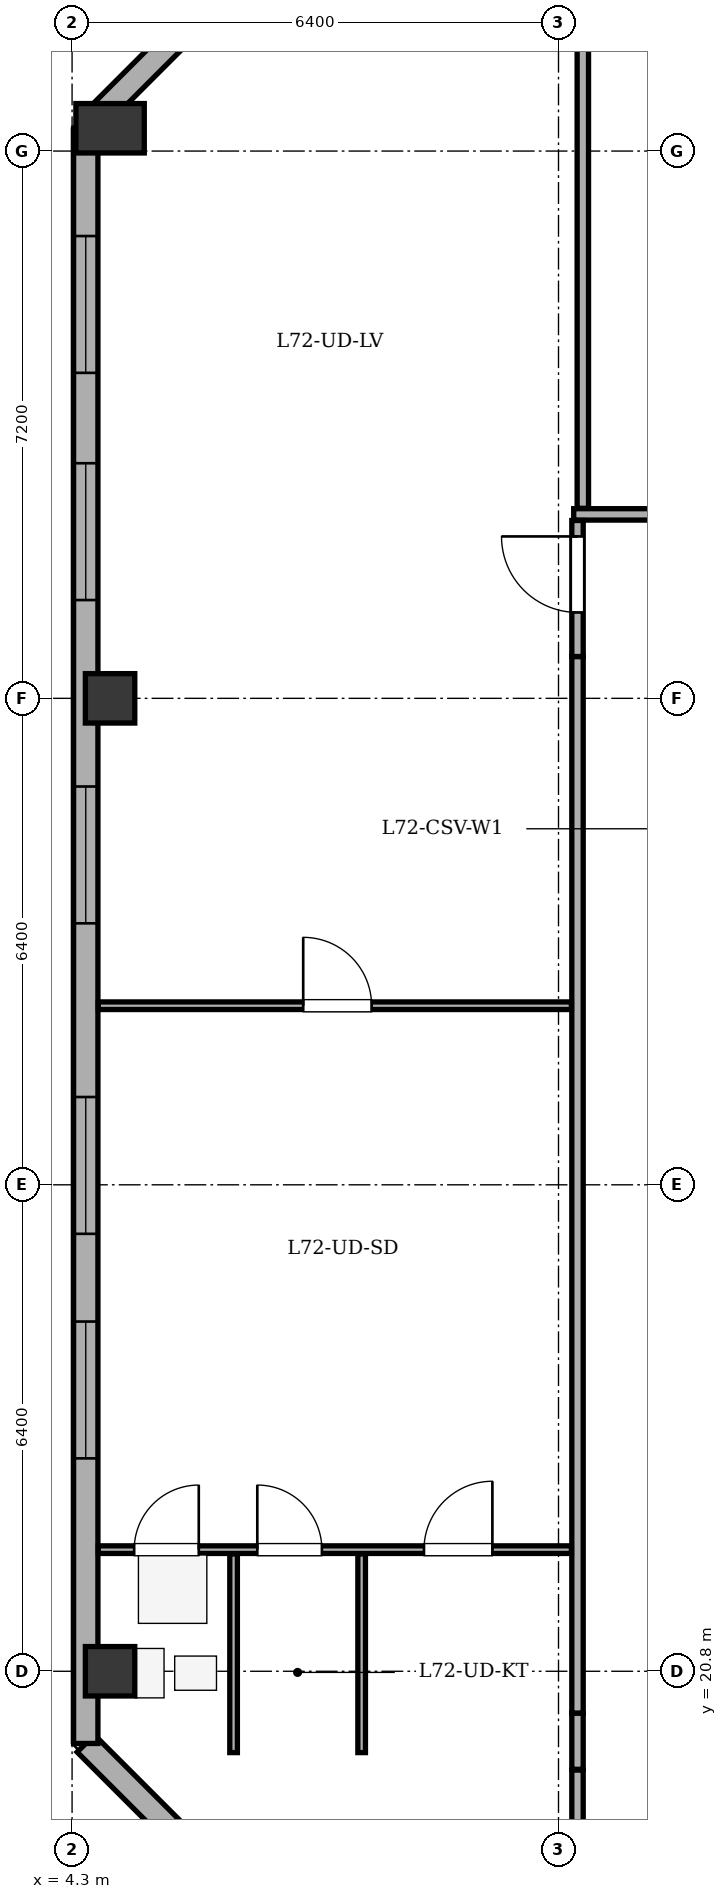
"""IFC4 building model, lengths in metres.
Left out: names, types, materials, properties, quantities, classifications, styles, units other than length and angle.
Written with IfcOpenShell. Run it as: python <this file> out.ifc"""

import sys

from ifc_helpers import new_model, si_unit, direction, frame, frame_2d, origin, origin_2d, place, context, subcontext, project, spatial, rectangle, extrude, element, fill, save


model = new_model("IFC4")
c1 = context("Model", 3, precision=1e-05, world=origin(), true_north=direction((0.0, 1.0)))
c2 = subcontext(c1, "Body", "Model", "MODEL_VIEW")
j1 = project(units=[si_unit("LENGTHUNIT", "METRE"), si_unit("PLANEANGLEUNIT", "RADIAN")], contexts=[c1])
p1 = place(None, origin())
s1 = spatial("IfcSite", under=j1, at=p1, CompositionType="ELEMENT")
p2 = place(p1, origin())
s2 = spatial("IfcBuilding", under=s1, at=p2, CompositionType="ELEMENT")
p3 = place(p2, frame((0.0, 0.0, 272.1)))
s3 = spatial("IfcBuildingStorey", under=s2, at=p3, CompositionType="ELEMENT", Elevation=272.1)
for number, where, z_axis, x_axis in (
    (1, (4.8, 20.8, 0.0), (0.0, 0.0, 1.0), (1.0, 0.0, 0.0)),
    (2, (4.8, 33.6, 0.0), (0.0, 0.0, 1.0), (1.0, 0.0, 0.0)),
):
    element("IfcColumn", number, at=place(p3, frame(where, z_axis=z_axis, x_axis=x_axis)), inside=s3, PredefinedType="COLUMN", context=c2, shape_type="SweptSolid", body=[
        extrude(rectangle(XDim=0.65, YDim=0.65, at=origin_2d()), origin(), (0.0, 0.0, 1.0), 3.4),
    ])
p4 = place(p3, frame((4.8, 41.1, 0.0), z_axis=(0.0, 0.0, 1.0), x_axis=(1.0, 0.0, 0.0)))
e3 = element("IfcColumn", 3, at=p4, inside=s3, PredefinedType="COLUMN", context=c2, shape_type="SweptSolid", body=[
    extrude(rectangle(XDim=0.65, YDim=0.9, at=origin_2d()), origin(), (0.0, 0.0, 1.0), 3.4),
])
p5 = place(p3, frame((8.3, 16.03, 0.0), z_axis=(0.0, 0.0, 1.0), x_axis=(-0.707106781187, 0.707106781187, 0.0)))
e4 = element("IfcWall", 4, at=p5, inside=s3, PredefinedType="STANDARD", context=c2, shape_type="SweptSolid", body=[
    extrude(rectangle(XDim=5.402, YDim=0.32, at=frame_2d((2.701, 0.0))), origin(), (0.0, 0.0, 1.0), 2.725),
])
p6 = place(p5, frame((2.001, 0.0, 0.75)))
e5 = element("IfcOpeningElement", 5, at=p6, cuts=e4, PredefinedType="OPENING", context=c2, shape_type="SweptSolid", body=[
    extrude(rectangle(XDim=1.4, YDim=1.65, at=frame_2d((0.7, 0.825))), frame((0.0, 0.17, 0.0), z_axis=(0.0, -1.0, 0.0), x_axis=(1.0, 0.0, 0.0)), (0.0, 0.0, 1.0), 0.34),
])
p7 = place(p3, frame((4.48, 19.85, 0.0), z_axis=(0.0, 0.0, 1.0), x_axis=(0.0, 1.0, 0.0)))
e6 = element("IfcWall", 6, at=p7, inside=s3, PredefinedType="STANDARD", context=c2, shape_type="SweptSolid", body=[
    extrude(rectangle(XDim=21.25, YDim=0.32, at=frame_2d((10.625, 0.0))), origin(), (0.0, 0.0, 1.0), 2.725),
])
p8 = place(p7, frame((3.751, 0.0, 0.75)))
e7 = element("IfcOpeningElement", 7, at=p8, cuts=e6, PredefinedType="OPENING", context=c2, shape_type="SweptSolid", body=[
    extrude(rectangle(XDim=1.8, YDim=1.7, at=frame_2d((0.9, 0.85))), frame((0.0, 0.17, 0.0), z_axis=(0.0, -1.0, 0.0), x_axis=(1.0, 0.0, 0.0)), (0.0, 0.0, 1.0), 0.34),
])
p9 = place(p7, frame((6.705, 0.0, 0.75)))
e8 = element("IfcOpeningElement", 8, at=p9, cuts=e6, PredefinedType="OPENING", context=c2, shape_type="SweptSolid", body=[
    extrude(rectangle(XDim=1.8, YDim=1.7, at=frame_2d((0.9, 0.85))), frame((0.0, 0.17, 0.0), z_axis=(0.0, -1.0, 0.0), x_axis=(1.0, 0.0, 0.0)), (0.0, 0.0, 1.0), 0.34),
])
p10 = place(p7, frame((10.79, 0.0, 0.75)))
e9 = element("IfcOpeningElement", 9, at=p10, cuts=e6, PredefinedType="OPENING", context=c2, shape_type="SweptSolid", body=[
    extrude(rectangle(XDim=1.8, YDim=1.7, at=frame_2d((0.9, 0.85))), frame((0.0, 0.17, 0.0), z_axis=(0.0, -1.0, 0.0), x_axis=(1.0, 0.0, 0.0)), (0.0, 0.0, 1.0), 0.34),
])
p11 = place(p7, frame((15.043, 0.0, 0.75)))
e10 = element("IfcOpeningElement", 10, at=p11, cuts=e6, PredefinedType="OPENING", context=c2, shape_type="SweptSolid", body=[
    extrude(rectangle(XDim=1.8, YDim=1.7, at=frame_2d((0.9, 0.85))), frame((0.0, 0.17, 0.0), z_axis=(0.0, -1.0, 0.0), x_axis=(1.0, 0.0, 0.0)), (0.0, 0.0, 1.0), 0.34),
])
p12 = place(p7, frame((18.032, 0.0, 0.75)))
e11 = element("IfcOpeningElement", 11, at=p12, cuts=e6, PredefinedType="OPENING", context=c2, shape_type="SweptSolid", body=[
    extrude(rectangle(XDim=1.8, YDim=1.7, at=frame_2d((0.9, 0.85))), frame((0.0, 0.17, 0.0), z_axis=(0.0, -1.0, 0.0), x_axis=(1.0, 0.0, 0.0)), (0.0, 0.0, 1.0), 0.34),
])
p13 = place(p3, frame((4.48, 41.1, 0.0), z_axis=(0.0, 0.0, 1.0), x_axis=(0.70712937715, 0.707084184501, 0.0)))
e12 = element("IfcWall", 12, at=p13, inside=s3, PredefinedType="STANDARD", context=c2, shape_type="SweptSolid", body=[
    extrude(rectangle(XDim=5.402, YDim=0.32, at=frame_2d((2.701, 0.0))), origin(), (0.0, 0.0, 1.0), 2.725),
])
p14 = place(p13, frame((2.001, 0.0, 0.75)))
e13 = element("IfcOpeningElement", 13, at=p14, cuts=e12, PredefinedType="OPENING", context=c2, shape_type="SweptSolid", body=[
    extrude(rectangle(XDim=1.4, YDim=1.65, at=frame_2d((0.7, 0.825))), frame((0.0, 0.17, 0.0), z_axis=(0.0, -1.0, 0.0), x_axis=(1.0, 0.0, 0.0)), (0.0, 0.0, 1.0), 0.34),
])
p15 = place(p3, frame((10.9, 36.02, 0.0), z_axis=(0.0, 0.0, 1.0), x_axis=(1.0, 0.0, 0.0)))
e14 = element("IfcWall", 14, at=p15, inside=s3, PredefinedType="PARTITIONING", context=c2, shape_type="SweptSolid", body=[
    extrude(rectangle(XDim=34.52, YDim=0.15, at=frame_2d((17.26, 0.0))), origin(), (0.0, 0.0, 1.0), 3.1),
])
p16 = place(p15, frame((5.276, 0.0, 0.0)))
e15 = element("IfcOpeningElement", 15, at=p16, cuts=e14, PredefinedType="OPENING", context=c2, shape_type="SweptSolid", body=[
    extrude(rectangle(XDim=1.0, YDim=2.1, at=frame_2d((0.5, 1.05))), frame((0.0, 0.085, 0.0), z_axis=(0.0, -1.0, 0.0), x_axis=(1.0, 0.0, 0.0)), (0.0, 0.0, 1.0), 0.17),
])
p17 = place(p15, frame((16.931, 0.0, 0.0)))
e16 = element("IfcOpeningElement", 16, at=p17, cuts=e14, PredefinedType="OPENING", context=c2, shape_type="SweptSolid", body=[
    extrude(rectangle(XDim=1.0, YDim=2.1, at=frame_2d((0.5, 1.05))), frame((0.0, 0.085, 0.0), z_axis=(0.0, -1.0, 0.0), x_axis=(1.0, 0.0, 0.0)), (0.0, 0.0, 1.0), 0.17),
])
p18 = place(p15, frame((28.415, 0.0, 0.0)))
e17 = element("IfcOpeningElement", 17, at=p18, cuts=e14, PredefinedType="OPENING", context=c2, shape_type="SweptSolid", body=[
    extrude(rectangle(XDim=1.0, YDim=2.1, at=frame_2d((0.5, 1.05))), frame((0.0, 0.085, 0.0), z_axis=(0.0, -1.0, 0.0), x_axis=(1.0, 0.0, 0.0)), (0.0, 0.0, 1.0), 0.17),
])
p19 = place(p3, frame((11.02, 36.1, 0.0), z_axis=(0.0, 0.0, 1.0), x_axis=(0.0, 1.0, 0.0)))
e18 = element("IfcWall", 18, at=p19, inside=s3, PredefinedType="PARTITIONING", context=c2, shape_type="SweptSolid", body=[
    extrude(rectangle(XDim=8.655, YDim=0.15, at=frame_2d((4.327, 0.0))), origin(), (0.0, 0.0, 1.0), 3.1),
])
p20 = place(p3, frame((10.95, 19.5, 0.0), z_axis=(0.0, 0.0, 1.0), x_axis=(0.0, -1.0, 0.0)))
e19 = element("IfcWall", 19, at=p20, inside=s3, PredefinedType="PARTITIONING", context=c2, shape_type="SweptSolid", body=[
    extrude(rectangle(XDim=0.96, YDim=0.15, at=frame_2d((0.48, 0.0))), origin(), (0.0, 0.0, 1.0), 3.1),
])
p21 = place(p3, frame((10.95, 19.51, 0.0), z_axis=(0.0, 0.0, 1.0), x_axis=(0.0, 1.0, 0.0)))
e20 = element("IfcWall", 20, at=p21, inside=s3, PredefinedType="PARTITIONING", context=c2, shape_type="SweptSolid", body=[
    extrude(rectangle(XDim=0.74, YDim=0.15, at=frame_2d((0.37, 0.0))), origin(), (0.0, 0.0, 1.0), 3.1),
])
p22 = place(p3, frame((10.95, 20.25, 0.0), z_axis=(0.0, 0.0, 1.0), x_axis=(0.0, 1.0, 0.0)))
e21 = element("IfcWall", 21, at=p22, inside=s3, PredefinedType="PARTITIONING", context=c2, shape_type="SweptSolid", body=[
    extrude(rectangle(XDim=13.9, YDim=0.15, at=frame_2d((6.95, 0.0))), origin(), (0.0, 0.0, 1.0), 3.1),
])
p23 = place(p3, frame((10.95, 34.15, 0.0), z_axis=(0.0, 0.0, 1.0), x_axis=(0.0, 1.0, 0.0)))
e22 = element("IfcWall", 22, at=p23, inside=s3, PredefinedType="PARTITIONING", context=c2, shape_type="SweptSolid", body=[
    extrude(rectangle(XDim=1.79, YDim=0.15, at=frame_2d((0.895, 0.0))), origin(), (0.0, 0.0, 1.0), 3.1),
])
p24 = place(p23, frame((0.58, 0.0, 0.0)))
e23 = element("IfcOpeningElement", 23, at=p24, cuts=e22, PredefinedType="OPENING", context=c2, shape_type="SweptSolid", body=[
    extrude(rectangle(XDim=1.0, YDim=2.1, at=frame_2d((0.5, 1.05))), frame((0.0, 0.085, 0.0), z_axis=(0.0, -1.0, 0.0), x_axis=(1.0, 0.0, 0.0)), (0.0, 0.0, 1.0), 0.17),
])
p25 = place(p3, frame((4.645, 22.4, 0.0), z_axis=(0.0, 0.0, 1.0), x_axis=(1.0, 0.0, 0.0)))
e24 = element("IfcWall", 24, at=p25, inside=s3, PredefinedType="PARTITIONING", context=c2, shape_type="SweptSolid", body=[
    extrude(rectangle(XDim=6.225, YDim=0.1, at=frame_2d((3.113, 0.0))), origin(), (0.0, 0.0, 1.0), 3.1),
])
p26 = place(p25, frame((0.472, 0.0, 0.0)))
e25 = element("IfcOpeningElement", 25, at=p26, cuts=e24, PredefinedType="OPENING", context=c2, shape_type="SweptSolid", body=[
    extrude(rectangle(XDim=0.85, YDim=2.05, at=frame_2d((0.425, 1.025))), frame((0.0, 0.06, 0.0), z_axis=(0.0, -1.0, 0.0), x_axis=(1.0, 0.0, 0.0)), (0.0, 0.0, 1.0), 0.12),
])
p27 = place(p25, frame((2.092, 0.0, 0.0)))
e26 = element("IfcOpeningElement", 26, at=p27, cuts=e24, PredefinedType="OPENING", context=c2, shape_type="SweptSolid", body=[
    extrude(rectangle(XDim=0.85, YDim=2.05, at=frame_2d((0.425, 1.025))), frame((0.0, 0.06, 0.0), z_axis=(0.0, -1.0, 0.0), x_axis=(1.0, 0.0, 0.0)), (0.0, 0.0, 1.0), 0.12),
])
p28 = place(p25, frame((4.285, 0.0, 0.0)))
e27 = element("IfcOpeningElement", 27, at=p28, cuts=e24, PredefinedType="OPENING", context=c2, shape_type="SweptSolid", body=[
    extrude(rectangle(XDim=0.9, YDim=2.05, at=frame_2d((0.45, 1.025))), frame((0.0, 0.06, 0.0), z_axis=(0.0, -1.0, 0.0), x_axis=(1.0, 0.0, 0.0)), (0.0, 0.0, 1.0), 0.12),
])
p29 = place(p3, frame((4.645, 29.556, 0.0), z_axis=(0.0, 0.0, 1.0), x_axis=(1.0, 0.0, 0.0)))
e28 = element("IfcWall", 28, at=p29, inside=s3, PredefinedType="PARTITIONING", context=c2, shape_type="SweptSolid", body=[
    extrude(rectangle(XDim=6.225, YDim=0.1, at=frame_2d((3.113, 0.0))), origin(), (0.0, 0.0, 1.0), 2.725),
])
p30 = place(p29, frame((2.696, 0.0, 0.0)))
e29 = element("IfcOpeningElement", 29, at=p30, cuts=e28, PredefinedType="OPENING", context=c2, shape_type="SweptSolid", body=[
    extrude(rectangle(XDim=0.9, YDim=2.05, at=frame_2d((0.45, 1.025))), frame((0.0, 0.06, 0.0), z_axis=(0.0, -1.0, 0.0), x_axis=(1.0, 0.0, 0.0)), (0.0, 0.0, 1.0), 0.12),
])
for number, where, z_axis, x_axis in (
    (30, (6.425, 19.73, 0.0), (0.0, 0.0, 1.0), (0.0, 1.0, 0.0)),
    (31, (8.11, 19.73, 0.0), (0.0, 0.0, 1.0), (0.0, 1.0, 0.0)),
):
    element("IfcWall", number, at=place(p3, frame(where, z_axis=z_axis, x_axis=x_axis)), inside=s3, PredefinedType="PARTITIONING", context=c2, shape_type="SweptSolid", body=[
        extrude(rectangle(XDim=2.615, YDim=0.1, at=frame_2d((1.308, 0.0))), origin(), (0.0, 0.0, 1.0), 3.1),
    ])
p31 = place(p8, origin())
e32 = element("IfcWindow", 32, at=p31, inside=s3, PartitioningType="SINGLE_PANEL", PredefinedType="WINDOW", context=c2, shape_type="SweptSolid", body=[
    extrude(rectangle(XDim=1.8, YDim=1.7, at=frame_2d((0.9, 0.85))), frame((0.0, -0.01, 0.0), z_axis=(0.0, -1.0, 0.0), x_axis=(1.0, 0.0, 0.0)), (0.0, 0.0, 1.0), 0.06),
])
fill(e7, e32)
p32 = place(p9, origin())
e33 = element("IfcWindow", 33, at=p32, inside=s3, PartitioningType="SINGLE_PANEL", PredefinedType="WINDOW", context=c2, shape_type="SweptSolid", body=[
    extrude(rectangle(XDim=1.8, YDim=1.7, at=frame_2d((0.9, 0.85))), frame((0.0, -0.01, 0.0), z_axis=(0.0, -1.0, 0.0), x_axis=(1.0, 0.0, 0.0)), (0.0, 0.0, 1.0), 0.06),
])
fill(e8, e33)
p33 = place(p10, origin())
e34 = element("IfcWindow", 34, at=p33, inside=s3, PartitioningType="SINGLE_PANEL", PredefinedType="WINDOW", context=c2, shape_type="SweptSolid", body=[
    extrude(rectangle(XDim=1.8, YDim=1.7, at=frame_2d((0.9, 0.85))), frame((0.0, -0.01, 0.0), z_axis=(0.0, -1.0, 0.0), x_axis=(1.0, 0.0, 0.0)), (0.0, 0.0, 1.0), 0.06),
])
fill(e9, e34)
p34 = place(p11, origin())
e35 = element("IfcWindow", 35, at=p34, inside=s3, PartitioningType="SINGLE_PANEL", PredefinedType="WINDOW", context=c2, shape_type="SweptSolid", body=[
    extrude(rectangle(XDim=1.8, YDim=1.7, at=frame_2d((0.9, 0.85))), frame((0.0, -0.01, 0.0), z_axis=(0.0, -1.0, 0.0), x_axis=(1.0, 0.0, 0.0)), (0.0, 0.0, 1.0), 0.06),
])
fill(e10, e35)
p35 = place(p12, origin())
e36 = element("IfcWindow", 36, at=p35, inside=s3, PartitioningType="SINGLE_PANEL", PredefinedType="WINDOW", context=c2, shape_type="SweptSolid", body=[
    extrude(rectangle(XDim=1.8, YDim=1.7, at=frame_2d((0.9, 0.85))), frame((0.0, -0.01, 0.0), z_axis=(0.0, -1.0, 0.0), x_axis=(1.0, 0.0, 0.0)), (0.0, 0.0, 1.0), 0.06),
])
fill(e11, e36)
p36 = place(p24, origin())
e37 = element("IfcDoor", 37, at=p36, inside=s3, OperationType="SINGLE_SWING_RIGHT", PredefinedType="DOOR", context=c2, shape_type="SweptSolid", body=[
    extrude(rectangle(XDim=1.0, YDim=2.1, at=frame_2d((0.5, 1.05))), frame((0.0, 0.025, 0.0), z_axis=(0.0, -1.0, 0.0), x_axis=(1.0, 0.0, 0.0)), (0.0, 0.0, 1.0), 0.05),
])
fill(e23, e37)
p37 = place(p30, origin())
e38 = element("IfcDoor", 38, at=p37, inside=s3, OperationType="SINGLE_SWING_LEFT", PredefinedType="DOOR", context=c2, shape_type="SweptSolid", body=[
    extrude(rectangle(XDim=0.9, YDim=2.05, at=frame_2d((0.45, 1.025))), frame((0.0, 0.025, 0.0), z_axis=(0.0, -1.0, 0.0), x_axis=(1.0, 0.0, 0.0)), (0.0, 0.0, 1.0), 0.05),
])
fill(e29, e38)
p38 = place(p26, origin())
e39 = element("IfcDoor", 39, at=p38, inside=s3, OperationType="SINGLE_SWING_RIGHT", PredefinedType="DOOR", context=c2, shape_type="SweptSolid", body=[
    extrude(rectangle(XDim=0.85, YDim=2.05, at=frame_2d((0.425, 1.025))), frame((0.0, 0.025, 0.0), z_axis=(0.0, -1.0, 0.0), x_axis=(1.0, 0.0, 0.0)), (0.0, 0.0, 1.0), 0.05),
])
fill(e25, e39)
p39 = place(p27, origin())
e40 = element("IfcDoor", 40, at=p39, inside=s3, OperationType="SINGLE_SWING_LEFT", PredefinedType="DOOR", context=c2, shape_type="SweptSolid", body=[
    extrude(rectangle(XDim=0.85, YDim=2.05, at=frame_2d((0.425, 1.025))), frame((0.0, 0.025, 0.0), z_axis=(0.0, -1.0, 0.0), x_axis=(1.0, 0.0, 0.0)), (0.0, 0.0, 1.0), 0.05),
])
fill(e26, e40)
p40 = place(p28, origin())
e41 = element("IfcDoor", 41, at=p40, inside=s3, OperationType="SINGLE_SWING_RIGHT", PredefinedType="DOOR", context=c2, shape_type="SweptSolid", body=[
    extrude(rectangle(XDim=0.9, YDim=2.05, at=frame_2d((0.45, 1.025))), frame((0.0, 0.025, 0.0), z_axis=(0.0, -1.0, 0.0), x_axis=(1.0, 0.0, 0.0)), (0.0, 0.0, 1.0), 0.05),
])
fill(e27, e41)
save(model, sys.argv[1])
